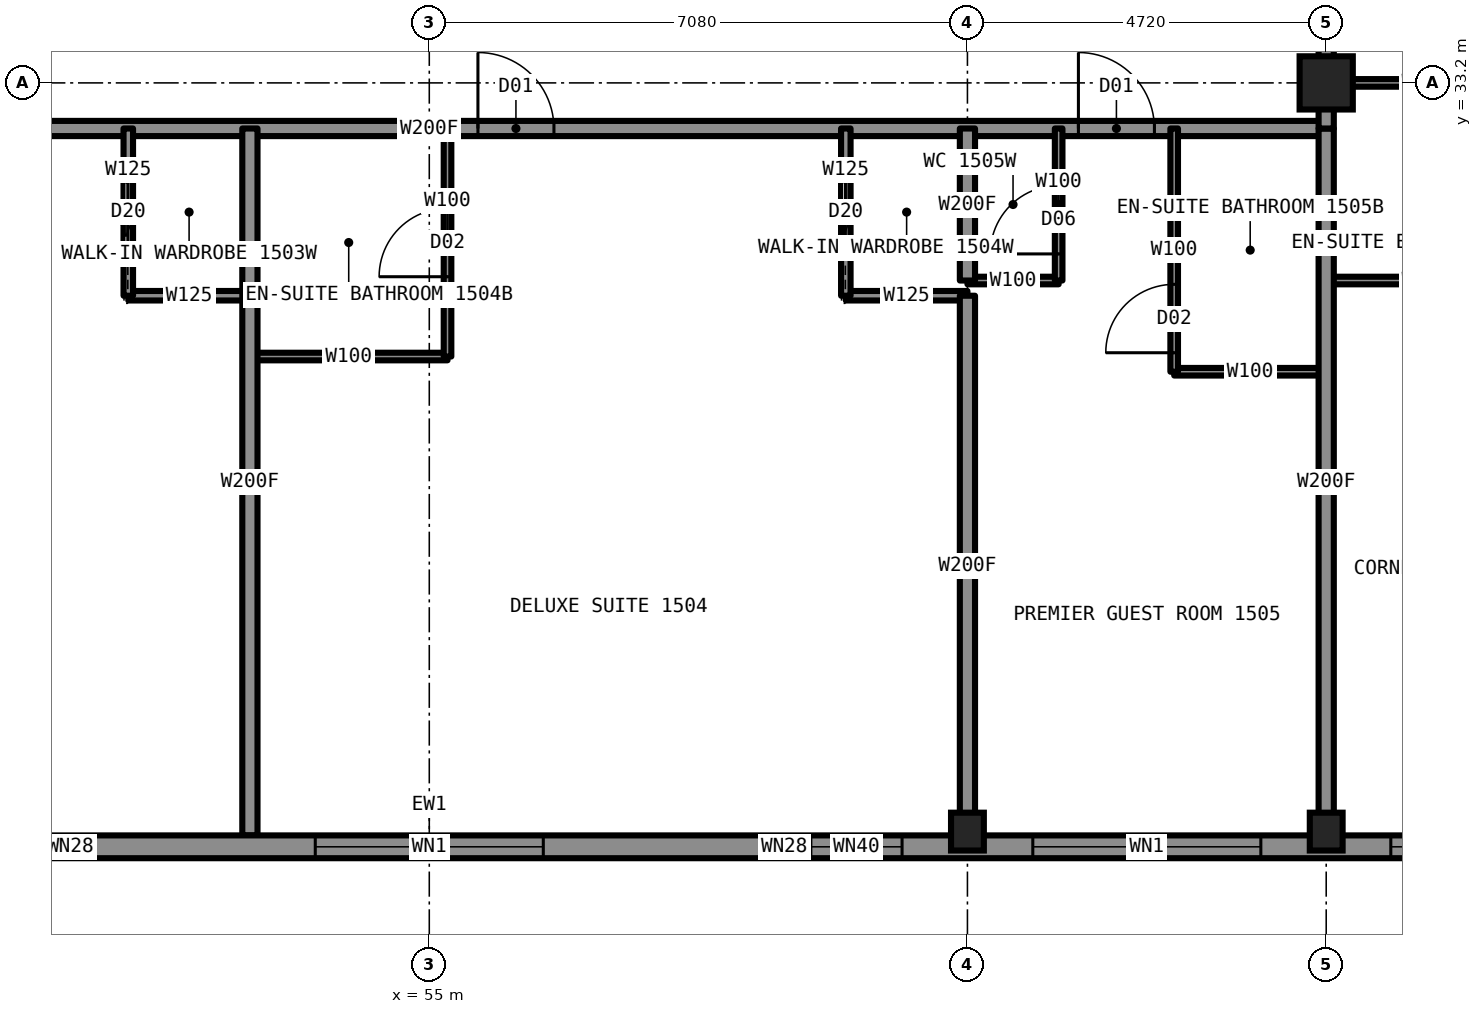
"""IFC4 building model, lengths in metres.
Left out: names, types, materials, properties, quantities, classifications, styles, units other than length and angle.
Written with IfcOpenShell. Run it as: python <this file> out.ifc"""

import sys

from ifc_helpers import new_model, si_unit, direction, frame, frame_2d, origin, origin_2d, place, context, subcontext, project, spatial, rectangle, hollow_rectangle, i_section, extrude, element, fill, save


model = new_model("IFC4")
c1 = context("Model", 3, precision=1e-05, world=origin(), true_north=direction((0.0, 1.0)))
c2 = subcontext(c1, "Body", "Model", "MODEL_VIEW")
j1 = project(units=[si_unit("LENGTHUNIT", "METRE"), si_unit("PLANEANGLEUNIT", "RADIAN")], contexts=[c1])
p1 = place(None, origin())
s1 = spatial("IfcSite", under=j1, at=p1, CompositionType="ELEMENT")
p2 = place(p1, origin())
s2 = spatial("IfcBuilding", under=s1, at=p2, CompositionType="ELEMENT")
p3 = place(p2, frame((0.0, 0.0, 60.0)))
s3 = spatial("IfcBuildingStorey", under=s2, at=p3, CompositionType="ELEMENT", Elevation=60.0)
for number, where, z_axis, x_axis in (
    (1, (62.08, 23.35, 0.0), (0.0, 0.0, 1.0), (1.0, 0.0, 0.0)),
    (2, (66.8, 23.35, 0.0), (0.0, 0.0, 1.0), (1.0, 0.0, 0.0)),
):
    element("IfcColumn", number, at=place(p3, frame(where, z_axis=z_axis, x_axis=x_axis)), inside=s3, PredefinedType="COLUMN", context=c2, shape_type="SweptSolid", body=[
        extrude(i_section(OverallWidth=0.432, OverallDepth=0.498, WebThickness=0.056, FlangeThickness=0.089, at=origin_2d()), origin(), (0.0, 0.0, 1.0), 3.5),
    ])
p4 = place(p3, frame((66.8, 33.2, 0.0), z_axis=(0.0, 0.0, 1.0), x_axis=(1.0, 0.0, 0.0)))
e3 = element("IfcColumn", 3, at=p4, inside=s3, PredefinedType="COLUMN", context=c2, shape_type="SweptSolid", body=[
    extrude(hollow_rectangle(XDim=0.7, YDim=0.7, WallThickness=0.06, at=origin_2d()), origin(), (0.0, 0.0, 1.0), 3.5),
])
p5 = place(p3, frame((66.8, 33.2, 0.0), z_axis=(0.0, 0.0, 1.0), x_axis=(1.0, 0.0, 0.0)))
e4 = element("IfcWall", 4, at=p5, inside=s3, PredefinedType="PARTITIONING", context=c2, shape_type="SweptSolid", body=[
    extrude(rectangle(XDim=2.6, YDim=0.1, at=frame_2d((1.3, 0.0))), origin(), (0.0, 0.0, 1.0), 2.573),
])
p6 = place(p3, frame((43.2, 32.6, 0.0), z_axis=(0.0, 0.0, 1.0), x_axis=(1.0, 0.0, 0.0)))
e5 = element("IfcWall", 5, at=p6, inside=s3, PredefinedType="PARTITIONING", context=c2, shape_type="SweptSolid", body=[
    extrude(rectangle(XDim=23.6, YDim=0.2, at=frame_2d((11.8, 0.0))), origin(), (0.0, 0.0, 1.0), 3.33),
])
p7 = place(p6, frame((3.0, 0.0, 0.0)))
e6 = element("IfcOpeningElement", 6, at=p7, cuts=e5, PredefinedType="OPENING", context=c2, shape_type="SweptSolid", body=[
    extrude(rectangle(XDim=1.0, YDim=2.2, at=frame_2d((0.5, 1.1))), frame((0.0, 0.11, 0.0), z_axis=(0.0, -1.0, 0.0), x_axis=(1.0, 0.0, 0.0)), (0.0, 0.0, 1.0), 0.22),
])
p8 = place(p6, frame((12.44, 0.0, 0.0)))
e7 = element("IfcOpeningElement", 7, at=p8, cuts=e5, PredefinedType="OPENING", context=c2, shape_type="SweptSolid", body=[
    extrude(rectangle(XDim=1.0, YDim=2.2, at=frame_2d((0.5, 1.1))), frame((0.0, 0.11, 0.0), z_axis=(0.0, -1.0, 0.0), x_axis=(1.0, 0.0, 0.0)), (0.0, 0.0, 1.0), 0.22),
])
p9 = place(p6, frame((20.34, 0.0, 0.0)))
e8 = element("IfcOpeningElement", 8, at=p9, cuts=e5, PredefinedType="OPENING", context=c2, shape_type="SweptSolid", body=[
    extrude(rectangle(XDim=1.0, YDim=2.2, at=frame_2d((0.5, 1.1))), frame((0.0, 0.11, 0.0), z_axis=(0.0, -1.0, 0.0), x_axis=(1.0, 0.0, 0.0)), (0.0, 0.0, 1.0), 0.22),
])
p10 = place(p3, frame((62.08, 30.6, 0.0), z_axis=(0.0, 0.0, 1.0), x_axis=(1.0, 0.0, 0.0)))
e9 = element("IfcWall", 9, at=p10, inside=s3, PredefinedType="PARTITIONING", context=c2, shape_type="SweptSolid", body=[
    extrude(rectangle(XDim=1.2, YDim=0.1, at=frame_2d((0.6, 0.0))), origin(), (0.0, 0.0, 1.0), 3.33),
])
p11 = place(p3, frame((66.8, 30.6, 0.0), z_axis=(0.0, 0.0, 1.0), x_axis=(1.0, 0.0, 0.0)))
e10 = element("IfcWall", 10, at=p11, inside=s3, PredefinedType="PARTITIONING", context=c2, shape_type="SweptSolid", body=[
    extrude(rectangle(XDim=2.6, YDim=0.1, at=frame_2d((1.3, 0.0))), origin(), (0.0, 0.0, 1.0), 3.33),
])
p12 = place(p3, frame((51.04, 30.4, 0.0), z_axis=(0.0, 0.0, 1.0), x_axis=(1.0, 0.0, 0.0)))
e11 = element("IfcWall", 11, at=p12, inside=s3, PredefinedType="PARTITIONING", context=c2, shape_type="SweptSolid", body=[
    extrude(rectangle(XDim=1.6, YDim=0.125, at=frame_2d((0.8, 0.0))), origin(), (0.0, 0.0, 1.0), 3.33),
])
p13 = place(p3, frame((60.48, 30.4, 0.0), z_axis=(0.0, 0.0, 1.0), x_axis=(1.0, 0.0, 0.0)))
e12 = element("IfcWall", 12, at=p13, inside=s3, PredefinedType="PARTITIONING", context=c2, shape_type="SweptSolid", body=[
    extrude(rectangle(XDim=1.6, YDim=0.125, at=frame_2d((0.8, 0.0))), origin(), (0.0, 0.0, 1.0), 3.33),
])
p14 = place(p3, frame((52.64, 29.6, 0.0), z_axis=(0.0, 0.0, 1.0), x_axis=(1.0, 0.0, 0.0)))
e13 = element("IfcWall", 13, at=p14, inside=s3, PredefinedType="PARTITIONING", context=c2, shape_type="SweptSolid", body=[
    extrude(rectangle(XDim=2.6, YDim=0.1, at=frame_2d((1.3, 0.0))), origin(), (0.0, 0.0, 1.0), 3.33),
])
p15 = place(p3, frame((64.8, 29.4, 0.0), z_axis=(0.0, 0.0, 1.0), x_axis=(1.0, 0.0, 0.0)))
e14 = element("IfcWall", 14, at=p15, inside=s3, PredefinedType="PARTITIONING", context=c2, shape_type="SweptSolid", body=[
    extrude(rectangle(XDim=2.0, YDim=0.1, at=frame_2d((1.0, 0.0))), origin(), (0.0, 0.0, 1.0), 3.33),
])
p16 = place(p3, frame((52.64, 23.3, 0.0), z_axis=(0.0, 0.0, 1.0), x_axis=(0.0, 1.0, 0.0)))
e15 = element("IfcWall", 15, at=p16, inside=s3, PredefinedType="PARTITIONING", context=c2, shape_type="SweptSolid", body=[
    extrude(rectangle(XDim=9.3, YDim=0.2, at=frame_2d((4.65, 0.0))), origin(), (0.0, 0.0, 1.0), 3.33),
])
p17 = place(p3, frame((51.04, 30.4, 0.0), z_axis=(0.0, 0.0, 1.0), x_axis=(0.0, 1.0, 0.0)))
e16 = element("IfcWall", 16, at=p17, inside=s3, PredefinedType="PARTITIONING", context=c2, shape_type="SweptSolid", body=[
    extrude(rectangle(XDim=2.2, YDim=0.125, at=frame_2d((1.1, 0.0))), origin(), (0.0, 0.0, 1.0), 3.33),
])
p18 = place(p17, frame((0.7, 0.0, 0.0)))
e17 = element("IfcOpeningElement", 17, at=p18, cuts=e16, PredefinedType="OPENING", context=c2, shape_type="SweptSolid", body=[
    extrude(rectangle(XDim=0.8, YDim=2.1, at=frame_2d((0.4, 1.05))), frame((0.0, 0.073, 0.0), z_axis=(0.0, -1.0, 0.0), x_axis=(1.0, 0.0, 0.0)), (0.0, 0.0, 1.0), 0.145),
])
p19 = place(p3, frame((55.24, 29.6, 0.0), z_axis=(0.0, 0.0, 1.0), x_axis=(0.0, 1.0, 0.0)))
e18 = element("IfcWall", 18, at=p19, inside=s3, PredefinedType="PARTITIONING", context=c2, shape_type="SweptSolid", body=[
    extrude(rectangle(XDim=3.0, YDim=0.1, at=frame_2d((1.5, 0.0))), origin(), (0.0, 0.0, 1.0), 3.33),
])
p20 = place(p19, frame((1.05, 0.0, 0.0)))
e19 = element("IfcOpeningElement", 19, at=p20, cuts=e18, PredefinedType="OPENING", context=c2, shape_type="SweptSolid", body=[
    extrude(rectangle(XDim=0.9, YDim=2.1, at=frame_2d((0.45, 1.05))), frame((0.0, 0.06, 0.0), z_axis=(0.0, -1.0, 0.0), x_axis=(1.0, 0.0, 0.0)), (0.0, 0.0, 1.0), 0.12),
])
p21 = place(p3, frame((66.8, 33.22, 0.0), z_axis=(0.0, 0.0, 1.0), x_axis=(0.0, 1.0, 0.0)))
e20 = element("IfcWall", 20, at=p21, inside=s3, PredefinedType="PARTITIONING", context=c2, shape_type="SweptSolid", body=[
    extrude(rectangle(XDim=23.58, YDim=0.2, at=frame_2d((11.79, 0.0))), origin(), (0.0, 0.0, 1.0), 3.33),
])
p22 = place(p21, frame((7.7, 0.0, 0.0)))
e21 = element("IfcOpeningElement", 21, at=p22, cuts=e20, PredefinedType="OPENING", context=c2, shape_type="SweptSolid", body=[
    extrude(rectangle(XDim=1.0, YDim=2.2, at=frame_2d((0.5, 1.1))), frame((0.0, 0.11, 0.0), z_axis=(0.0, -1.0, 0.0), x_axis=(1.0, 0.0, 0.0)), (0.0, 0.0, 1.0), 0.22),
])
p23 = place(p21, frame((17.29, 0.0, 0.0)))
e22 = element("IfcOpeningElement", 22, at=p23, cuts=e20, PredefinedType="OPENING", context=c2, shape_type="SweptSolid", body=[
    extrude(rectangle(XDim=1.0, YDim=2.2, at=frame_2d((0.5, 1.1))), frame((0.0, 0.11, 0.0), z_axis=(0.0, -1.0, 0.0), x_axis=(1.0, 0.0, 0.0)), (0.0, 0.0, 1.0), 0.22),
])
p24 = place(p21, frame((21.83, 0.0, 0.0)))
e23 = element("IfcOpeningElement", 23, at=p24, cuts=e20, PredefinedType="OPENING", context=c2, shape_type="SweptSolid", body=[
    extrude(rectangle(XDim=1.1, YDim=2.2, at=frame_2d((0.55, 1.1))), frame((0.0, 0.11, 0.0), z_axis=(0.0, -1.0, 0.0), x_axis=(1.0, 0.0, 0.0)), (0.0, 0.0, 1.0), 0.22),
])
p25 = place(p21, frame((0.63, 0.0, 0.0)))
e24 = element("IfcOpeningElement", 24, at=p25, cuts=e20, PredefinedType="OPENING", context=c2, shape_type="SweptSolid", body=[
    extrude(rectangle(XDim=1.1, YDim=2.2, at=frame_2d((0.55, 1.1))), frame((0.0, 0.11, 0.0), z_axis=(0.0, -1.0, 0.0), x_axis=(1.0, 0.0, 0.0)), (0.0, 0.0, 1.0), 0.22),
])
p26 = place(p3, frame((66.8, 23.3, 0.0), z_axis=(0.0, 0.0, 1.0), x_axis=(0.0, 1.0, 0.0)))
e25 = element("IfcWall", 25, at=p26, inside=s3, PredefinedType="PARTITIONING", context=c2, shape_type="SweptSolid", body=[
    extrude(rectangle(XDim=9.3, YDim=0.2, at=frame_2d((4.65, 0.0))), origin(), (0.0, 0.0, 1.0), 2.573),
])
p27 = place(p3, frame((60.48, 30.4, 0.0), z_axis=(0.0, 0.0, 1.0), x_axis=(0.0, 1.0, 0.0)))
e26 = element("IfcWall", 26, at=p27, inside=s3, PredefinedType="PARTITIONING", context=c2, shape_type="SweptSolid", body=[
    extrude(rectangle(XDim=2.2, YDim=0.125, at=frame_2d((1.1, 0.0))), origin(), (0.0, 0.0, 1.0), 3.33),
])
p28 = place(p27, frame((0.7, 0.0, 0.0)))
e27 = element("IfcOpeningElement", 27, at=p28, cuts=e26, PredefinedType="OPENING", context=c2, shape_type="SweptSolid", body=[
    extrude(rectangle(XDim=0.8, YDim=2.1, at=frame_2d((0.4, 1.05))), frame((0.0, 0.073, 0.0), z_axis=(0.0, -1.0, 0.0), x_axis=(1.0, 0.0, 0.0)), (0.0, 0.0, 1.0), 0.145),
])
p29 = place(p3, frame((62.08, 23.3, 0.0), z_axis=(0.0, 0.0, 1.0), x_axis=(0.0, 1.0, 0.0)))
e28 = element("IfcWall", 28, at=p29, inside=s3, PredefinedType="PARTITIONING", context=c2, shape_type="SweptSolid", body=[
    extrude(rectangle(XDim=7.1, YDim=0.2, at=frame_2d((3.55, 0.0))), origin(), (0.0, 0.0, 1.0), 2.573),
])
p30 = place(p3, frame((62.08, 30.6, 0.0), z_axis=(0.0, 0.0, 1.0), x_axis=(0.0, 1.0, 0.0)))
e29 = element("IfcWall", 29, at=p30, inside=s3, PredefinedType="PARTITIONING", context=c2, shape_type="SweptSolid", body=[
    extrude(rectangle(XDim=2.0, YDim=0.2, at=frame_2d((1.0, 0.0))), origin(), (0.0, 0.0, 1.0), 2.573),
])
p31 = place(p3, frame((63.28, 30.6, 0.0), z_axis=(0.0, 0.0, 1.0), x_axis=(0.0, 1.0, 0.0)))
e30 = element("IfcWall", 30, at=p31, inside=s3, PredefinedType="PARTITIONING", context=c2, shape_type="SweptSolid", body=[
    extrude(rectangle(XDim=2.0, YDim=0.1, at=frame_2d((1.0, 0.0))), origin(), (0.0, 0.0, 1.0), 3.33),
])
p32 = place(p31, frame((0.35, 0.0, 0.0)))
e31 = element("IfcOpeningElement", 31, at=p32, cuts=e30, PredefinedType="OPENING", context=c2, shape_type="SweptSolid", body=[
    extrude(rectangle(XDim=0.9, YDim=2.1, at=frame_2d((0.45, 1.05))), frame((0.0, 0.06, 0.0), z_axis=(0.0, -1.0, 0.0), x_axis=(1.0, 0.0, 0.0)), (0.0, 0.0, 1.0), 0.12),
])
p33 = place(p3, frame((64.8, 29.4, 0.0), z_axis=(0.0, 0.0, 1.0), x_axis=(0.0, 1.0, 0.0)))
e32 = element("IfcWall", 32, at=p33, inside=s3, PredefinedType="PARTITIONING", context=c2, shape_type="SweptSolid", body=[
    extrude(rectangle(XDim=3.2, YDim=0.1, at=frame_2d((1.6, 0.0))), origin(), (0.0, 0.0, 1.0), 3.33),
])
p34 = place(p33, frame((0.25, 0.0, 0.0)))
e33 = element("IfcOpeningElement", 33, at=p34, cuts=e32, PredefinedType="OPENING", context=c2, shape_type="SweptSolid", body=[
    extrude(rectangle(XDim=0.9, YDim=2.1, at=frame_2d((0.45, 1.05))), frame((0.0, 0.06, 0.0), z_axis=(0.0, -1.0, 0.0), x_axis=(1.0, 0.0, 0.0)), (0.0, 0.0, 1.0), 0.12),
])
p35 = place(p3, frame((38.5, 23.15, 0.0), z_axis=(0.0, 0.0, 1.0), x_axis=(1.0, 0.0, 0.0)))
e34 = element("IfcWall", 34, at=p35, inside=s3, PredefinedType="SOLIDWALL", context=c2, shape_type="SweptSolid", body=[
    extrude(rectangle(XDim=33.0, YDim=0.3, at=frame_2d((16.5, 0.0))), origin(), (0.0, 0.0, 1.0), 2.83),
])
p36 = place(p35, frame((0.85, 0.0, 0.5)))
e35 = element("IfcOpeningElement", 35, at=p36, cuts=e34, PredefinedType="OPENING", context=c2, shape_type="SweptSolid", body=[
    extrude(rectangle(XDim=3.0, YDim=2.0, at=frame_2d((1.5, 1.0))), frame((0.0, 0.16, 0.0), z_axis=(0.0, -1.0, 0.0), x_axis=(1.0, 0.0, 0.0)), (0.0, 0.0, 1.0), 0.32),
])
p37 = place(p35, frame((5.56, 0.0, 0.5)))
e36 = element("IfcOpeningElement", 36, at=p37, cuts=e34, PredefinedType="OPENING", context=c2, shape_type="SweptSolid", body=[
    extrude(rectangle(XDim=3.0, YDim=2.0, at=frame_2d((1.5, 1.0))), frame((0.0, 0.16, 0.0), z_axis=(0.0, -1.0, 0.0), x_axis=(1.0, 0.0, 0.0)), (0.0, 0.0, 1.0), 0.32),
])
p38 = place(p35, frame((10.28, 0.0, 0.5)))
e37 = element("IfcOpeningElement", 37, at=p38, cuts=e34, PredefinedType="OPENING", context=c2, shape_type="SweptSolid", body=[
    extrude(rectangle(XDim=1.2, YDim=1.7, at=frame_2d((0.6, 0.85))), frame((0.0, 0.16, 0.0), z_axis=(0.0, -1.0, 0.0), x_axis=(1.0, 0.0, 0.0)), (0.0, 0.0, 1.0), 0.32),
])
p39 = place(p35, frame((15.0, 0.0, 0.5)))
e38 = element("IfcOpeningElement", 38, at=p39, cuts=e34, PredefinedType="OPENING", context=c2, shape_type="SweptSolid", body=[
    extrude(rectangle(XDim=3.0, YDim=2.0, at=frame_2d((1.5, 1.0))), frame((0.0, 0.16, 0.0), z_axis=(0.0, -1.0, 0.0), x_axis=(1.0, 0.0, 0.0)), (0.0, 0.0, 1.0), 0.32),
])
p40 = place(p35, frame((21.52, 0.0, 0.5)))
e39 = element("IfcOpeningElement", 39, at=p40, cuts=e34, PredefinedType="OPENING", context=c2, shape_type="SweptSolid", body=[
    extrude(rectangle(XDim=1.2, YDim=1.7, at=frame_2d((0.6, 0.85))), frame((0.0, 0.16, 0.0), z_axis=(0.0, -1.0, 0.0), x_axis=(1.0, 0.0, 0.0)), (0.0, 0.0, 1.0), 0.32),
])
p41 = place(p35, frame((24.44, 0.0, 0.5)))
e40 = element("IfcOpeningElement", 40, at=p41, cuts=e34, PredefinedType="OPENING", context=c2, shape_type="SweptSolid", body=[
    extrude(rectangle(XDim=3.0, YDim=2.0, at=frame_2d((1.5, 1.0))), frame((0.0, 0.16, 0.0), z_axis=(0.0, -1.0, 0.0), x_axis=(1.0, 0.0, 0.0)), (0.0, 0.0, 1.0), 0.32),
])
p42 = place(p35, frame((29.15, 0.0, 0.5)))
e41 = element("IfcOpeningElement", 41, at=p42, cuts=e34, PredefinedType="OPENING", context=c2, shape_type="SweptSolid", body=[
    extrude(rectangle(XDim=3.0, YDim=2.0, at=frame_2d((1.5, 1.0))), frame((0.0, 0.16, 0.0), z_axis=(0.0, -1.0, 0.0), x_axis=(1.0, 0.0, 0.0)), (0.0, 0.0, 1.0), 0.32),
])
p43 = place(p35, frame((11.48, 0.0, 0.5)))
e42 = element("IfcOpeningElement", 42, at=p43, cuts=e34, PredefinedType="OPENING", context=c2, shape_type="SweptSolid", body=[
    extrude(rectangle(XDim=0.6, YDim=0.8, at=frame_2d((0.3, 0.4))), frame((0.0, 0.16, 0.0), z_axis=(0.0, -1.0, 0.0), x_axis=(1.0, 0.0, 0.0)), (0.0, 0.0, 1.0), 0.32),
])
p44 = place(p35, frame((20.87, 0.0, 0.5)))
e43 = element("IfcOpeningElement", 43, at=p44, cuts=e34, PredefinedType="OPENING", context=c2, shape_type="SweptSolid", body=[
    extrude(rectangle(XDim=0.6, YDim=0.8, at=frame_2d((0.3, 0.4))), frame((0.0, 0.16, 0.0), z_axis=(0.0, -1.0, 0.0), x_axis=(1.0, 0.0, 0.0)), (0.0, 0.0, 1.0), 0.32),
])
p45 = place(p3, frame((66.8, 32.6, 0.0), z_axis=(0.0, 0.0, 1.0), x_axis=(0.0, 1.0, 0.0)))
e44 = element("IfcWall", 44, at=p45, inside=s3, PredefinedType="PARTITIONING", context=c2, shape_type="SweptSolid", body=[
    extrude(rectangle(XDim=0.62, YDim=0.2, at=frame_2d((0.31, 0.0))), origin(), (0.0, 0.0, 1.0), 2.573),
])
p46 = place(p18, origin())
e45 = element("IfcDoor", 45, at=p46, inside=s3, OperationType="SLIDING_TO_LEFT", PredefinedType="DOOR", context=c2, shape_type="SweptSolid", body=[
    extrude(rectangle(XDim=0.8, YDim=2.1, at=frame_2d((0.4, 1.05))), frame((0.0, 0.025, 0.0), z_axis=(0.0, -1.0, 0.0), x_axis=(1.0, 0.0, 0.0)), (0.0, 0.0, 1.0), 0.05),
])
fill(e17, e45)
p47 = place(p8, origin())
e46 = element("IfcDoor", 46, at=p47, inside=s3, OperationType="SINGLE_SWING_LEFT", PredefinedType="DOOR", context=c2, shape_type="SweptSolid", body=[
    extrude(rectangle(XDim=1.0, YDim=2.2, at=frame_2d((0.5, 1.1))), frame((0.0, 0.025, 0.0), z_axis=(0.0, -1.0, 0.0), x_axis=(1.0, 0.0, 0.0)), (0.0, 0.0, 1.0), 0.05),
])
fill(e7, e46)
p48 = place(p20, origin())
e47 = element("IfcDoor", 47, at=p48, inside=s3, OperationType="SINGLE_SWING_RIGHT", PredefinedType="DOOR", context=c2, shape_type="SweptSolid", body=[
    extrude(rectangle(XDim=0.9, YDim=2.1, at=frame_2d((0.45, 1.05))), frame((0.0, 0.025, 0.0), z_axis=(0.0, -1.0, 0.0), x_axis=(1.0, 0.0, 0.0)), (0.0, 0.0, 1.0), 0.05),
])
fill(e19, e47)
p49 = place(p28, origin())
e48 = element("IfcDoor", 48, at=p49, inside=s3, OperationType="SLIDING_TO_LEFT", PredefinedType="DOOR", context=c2, shape_type="SweptSolid", body=[
    extrude(rectangle(XDim=0.8, YDim=2.1, at=frame_2d((0.4, 1.05))), frame((0.0, 0.025, 0.0), z_axis=(0.0, -1.0, 0.0), x_axis=(1.0, 0.0, 0.0)), (0.0, 0.0, 1.0), 0.05),
])
fill(e27, e48)
p50 = place(p9, origin())
e49 = element("IfcDoor", 49, at=p50, inside=s3, OperationType="SINGLE_SWING_LEFT", PredefinedType="DOOR", context=c2, shape_type="SweptSolid", body=[
    extrude(rectangle(XDim=1.0, YDim=2.2, at=frame_2d((0.5, 1.1))), frame((0.0, 0.025, 0.0), z_axis=(0.0, -1.0, 0.0), x_axis=(1.0, 0.0, 0.0)), (0.0, 0.0, 1.0), 0.05),
])
fill(e8, e49)
p51 = place(p34, origin())
e50 = element("IfcDoor", 50, at=p51, inside=s3, OperationType="SINGLE_SWING_RIGHT", PredefinedType="DOOR", context=c2, shape_type="SweptSolid", body=[
    extrude(rectangle(XDim=0.9, YDim=2.1, at=frame_2d((0.45, 1.05))), frame((0.0, 0.025, 0.0), z_axis=(0.0, -1.0, 0.0), x_axis=(1.0, 0.0, 0.0)), (0.0, 0.0, 1.0), 0.05),
])
fill(e33, e50)
p52 = place(p32, origin())
e51 = element("IfcDoor", 51, at=p52, inside=s3, OperationType="SINGLE_SWING_LEFT", PredefinedType="DOOR", context=c2, shape_type="SweptSolid", body=[
    extrude(rectangle(XDim=0.9, YDim=2.1, at=frame_2d((0.45, 1.05))), frame((0.0, 0.025, 0.0), z_axis=(0.0, -1.0, 0.0), x_axis=(1.0, 0.0, 0.0)), (0.0, 0.0, 1.0), 0.05),
])
fill(e31, e51)
p53 = place(p39, origin())
e52 = element("IfcWindow", 52, at=p53, inside=s3, PartitioningType="SINGLE_PANEL", PredefinedType="WINDOW", context=c2, shape_type="SweptSolid", body=[
    extrude(rectangle(XDim=3.0, YDim=2.0, at=frame_2d((1.5, 1.0))), frame((0.0, 0.03, 0.0), z_axis=(0.0, -1.0, 0.0), x_axis=(1.0, 0.0, 0.0)), (0.0, 0.0, 1.0), 0.06),
])
fill(e38, e52)
p54 = place(p40, origin())
e53 = element("IfcWindow", 53, at=p54, inside=s3, PartitioningType="SINGLE_PANEL", PredefinedType="WINDOW", context=c2, shape_type="SweptSolid", body=[
    extrude(rectangle(XDim=1.2, YDim=1.7, at=frame_2d((0.6, 0.85))), frame((0.0, 0.03, 0.0), z_axis=(0.0, -1.0, 0.0), x_axis=(1.0, 0.0, 0.0)), (0.0, 0.0, 1.0), 0.06),
])
fill(e39, e53)
p55 = place(p41, origin())
e54 = element("IfcWindow", 54, at=p55, inside=s3, PartitioningType="SINGLE_PANEL", PredefinedType="WINDOW", context=c2, shape_type="SweptSolid", body=[
    extrude(rectangle(XDim=3.0, YDim=2.0, at=frame_2d((1.5, 1.0))), frame((0.0, 0.03, 0.0), z_axis=(0.0, -1.0, 0.0), x_axis=(1.0, 0.0, 0.0)), (0.0, 0.0, 1.0), 0.06),
])
fill(e40, e54)
p56 = place(p42, origin())
e55 = element("IfcWindow", 55, at=p56, inside=s3, PartitioningType="SINGLE_PANEL", PredefinedType="WINDOW", context=c2, shape_type="SweptSolid", body=[
    extrude(rectangle(XDim=3.0, YDim=2.0, at=frame_2d((1.5, 1.0))), frame((0.0, 0.03, 0.0), z_axis=(0.0, -1.0, 0.0), x_axis=(1.0, 0.0, 0.0)), (0.0, 0.0, 1.0), 0.06),
])
fill(e41, e55)
p57 = place(p43, origin())
e56 = element("IfcWindow", 56, at=p57, inside=s3, PartitioningType="SINGLE_PANEL", PredefinedType="WINDOW", context=c2, shape_type="SweptSolid", body=[
    extrude(rectangle(XDim=0.6, YDim=0.8, at=frame_2d((0.3, 0.4))), frame((0.0, 0.03, 0.0), z_axis=(0.0, -1.0, 0.0), x_axis=(1.0, 0.0, 0.0)), (0.0, 0.0, 1.0), 0.06),
])
fill(e42, e56)
p58 = place(p44, origin())
e57 = element("IfcWindow", 57, at=p58, inside=s3, PartitioningType="SINGLE_PANEL", PredefinedType="WINDOW", context=c2, shape_type="SweptSolid", body=[
    extrude(rectangle(XDim=0.6, YDim=0.8, at=frame_2d((0.3, 0.4))), frame((0.0, 0.03, 0.0), z_axis=(0.0, -1.0, 0.0), x_axis=(1.0, 0.0, 0.0)), (0.0, 0.0, 1.0), 0.06),
])
fill(e43, e57)
save(model, sys.argv[1])
